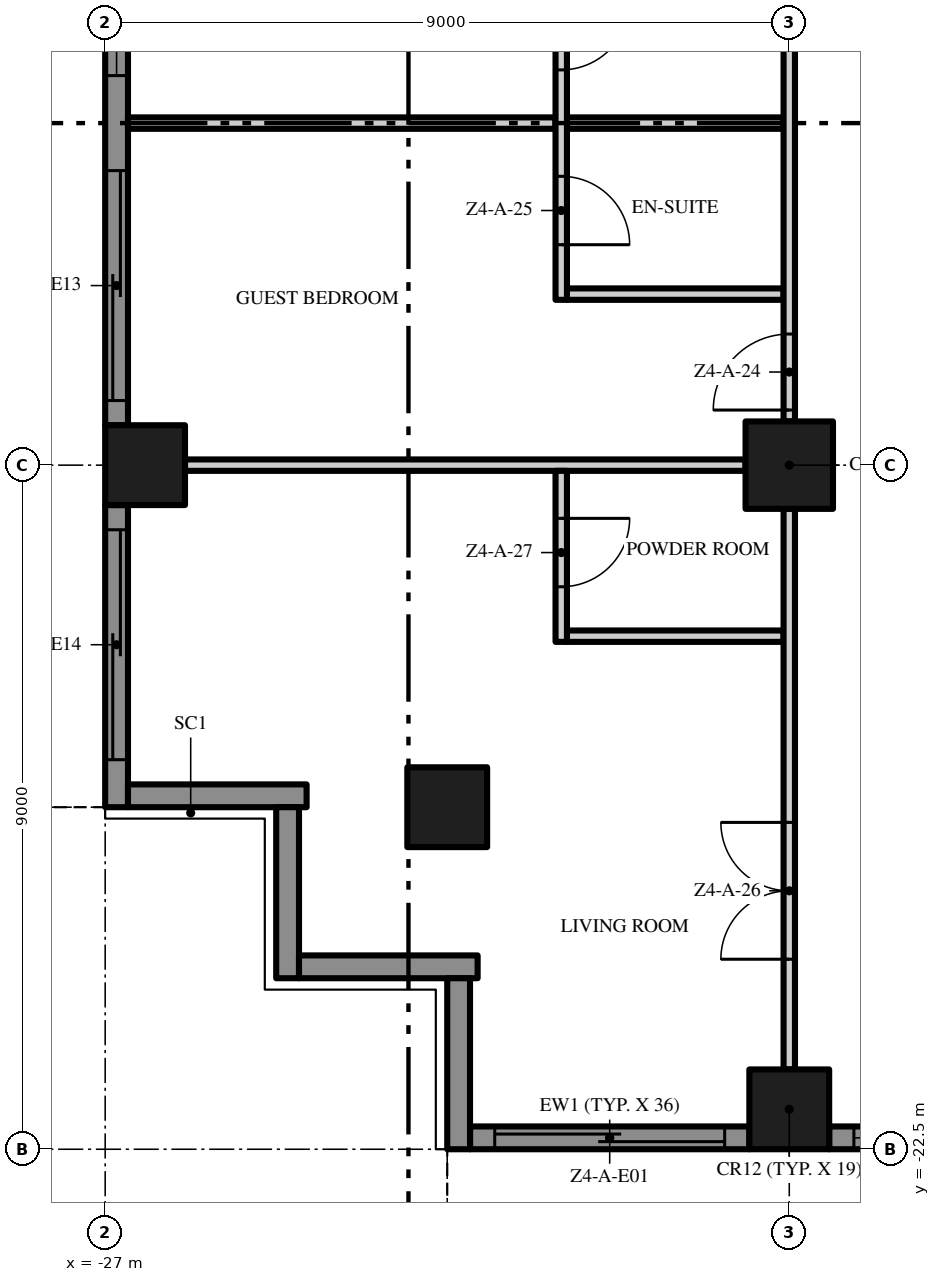
"""IFC4 building model, lengths in metres.
Left out: names, types, materials, properties, quantities, classifications, styles, units other than length and angle.
Written with IfcOpenShell. Run it as: python <this file> out.ifc"""

import sys

from ifc_helpers import new_model, si_unit, direction, frame, frame_2d, origin, origin_2d, place, context, subcontext, project, spatial, polyline, rectangle, outline, extrude, element, fill, save


model = new_model("IFC4")
c1 = context("Model", 3, precision=1e-05, world=origin(), true_north=direction((0.0, 1.0)))
c2 = subcontext(c1, "Body", "Model", "MODEL_VIEW")
j1 = project(units=[si_unit("LENGTHUNIT", "METRE"), si_unit("PLANEANGLEUNIT", "RADIAN")], contexts=[c1])
p1 = place(None, origin())
s1 = spatial("IfcSite", under=j1, at=p1, CompositionType="ELEMENT")
p2 = place(p1, origin())
s2 = spatial("IfcBuilding", under=s1, at=p2, CompositionType="ELEMENT")
p3 = place(p2, frame((0.0, 0.0, 184.4)))
s3 = spatial("IfcBuildingStorey", under=s2, at=p3, CompositionType="ELEMENT", Elevation=184.4)
p4 = place(p3, frame((-18.0, -13.5, 0.0), z_axis=(0.0, 0.0, 1.0), x_axis=(1.0, 0.0, 0.0)))
e1 = element("IfcColumn", 1, at=p4, inside=s3, PredefinedType="COLUMN", context=c2, shape_type="SweptSolid", body=[
    extrude(rectangle(XDim=1.15, YDim=1.15, at=origin_2d()), origin(), (0.0, 0.0, 1.0), 3.5),
])
for number, where, z_axis, x_axis in (
    (2, (-18.0, -21.975, 0.0), (0.0, 0.0, 1.0), (1.0, 0.0, 0.0)),
    (3, (-26.475, -13.5, 0.0), (0.0, 0.0, 1.0), (1.0, 0.0, 0.0)),
    (4, (-22.5, -18.0, 0.0), (0.0, 0.0, 1.0), (1.0, 0.0, 0.0)),
):
    element("IfcColumn", number, at=place(p3, frame(where, z_axis=z_axis, x_axis=x_axis)), inside=s3, PredefinedType="COLUMN", context=c2, shape_type="SweptSolid", body=[
        extrude(rectangle(XDim=1.05, YDim=1.05, at=origin_2d()), origin(), (0.0, 0.0, 1.0), 3.5),
    ])
p5 = place(p3, frame((-18.525, -22.35, 0.0), z_axis=(0.0, 0.0, 1.0), x_axis=(-1.0, 0.0, 0.0)))
e5 = element("IfcWall", 5, at=p5, inside=s3, PredefinedType="SOLIDWALL", context=c2, shape_type="SweptSolid", body=[
    extrude(rectangle(XDim=3.675, YDim=0.3, at=frame_2d((1.837, 0.0))), origin(), (0.0, 0.0, 1.0), 3.5),
])
p6 = place(p5, frame((0.325, 0.0, 0.0)))
e6 = element("IfcOpeningElement", 6, at=p6, cuts=e5, PredefinedType="OPENING", context=c2, shape_type="SweptSolid", body=[
    extrude(rectangle(XDim=3.025, YDim=2.4, at=frame_2d((1.512, 1.2))), frame((0.0, 0.16, 0.0), z_axis=(0.0, -1.0, 0.0), x_axis=(1.0, 0.0, 0.0)), (0.0, 0.0, 1.0), 0.32),
])
p7 = place(p3, frame((-9.525, -22.35, 0.0), z_axis=(0.0, 0.0, 1.0), x_axis=(-1.0, 0.0, 0.0)))
e7 = element("IfcWall", 7, at=p7, inside=s3, PredefinedType="SOLIDWALL", context=c2, shape_type="SweptSolid", body=[
    extrude(rectangle(XDim=7.95, YDim=0.3, at=frame_2d((3.975, 0.0))), origin(), (0.0, 0.0, 1.0), 3.5),
])
p8 = place(p7, frame((4.6, 0.0, 0.45)))
e8 = element("IfcOpeningElement", 8, at=p8, cuts=e7, PredefinedType="OPENING", context=c2, shape_type="SweptSolid", body=[
    extrude(rectangle(XDim=3.025, YDim=2.65, at=frame_2d((1.512, 1.325))), frame((0.0, 0.16, 0.0), z_axis=(0.0, -1.0, 0.0), x_axis=(1.0, 0.0, 0.0)), (0.0, 0.0, 1.0), 0.32),
])
p9 = place(p7, frame((0.325, 0.0, 0.45)))
e9 = element("IfcOpeningElement", 9, at=p9, cuts=e7, PredefinedType="OPENING", context=c2, shape_type="SweptSolid", body=[
    extrude(rectangle(XDim=3.025, YDim=2.65, at=frame_2d((1.512, 1.325))), frame((0.0, 0.16, 0.0), z_axis=(0.0, -1.0, 0.0), x_axis=(1.0, 0.0, 0.0)), (0.0, 0.0, 1.0), 0.32),
])
p10 = place(p3, frame((-26.85, -12.975, 0.0), z_axis=(0.0, 0.0, 1.0), x_axis=(0.0, 1.0, 0.0)))
e10 = element("IfcWall", 10, at=p10, inside=s3, PredefinedType="SOLIDWALL", context=c2, shape_type="SweptSolid", body=[
    extrude(rectangle(XDim=7.95, YDim=0.3, at=frame_2d((3.975, 0.0))), origin(), (0.0, 0.0, 1.0), 3.5),
])
p11 = place(p10, frame((4.6, 0.0, 0.45)))
e11 = element("IfcOpeningElement", 11, at=p11, cuts=e10, PredefinedType="OPENING", context=c2, shape_type="SweptSolid", body=[
    extrude(rectangle(XDim=3.025, YDim=2.65, at=frame_2d((1.512, 1.325))), frame((0.0, 0.16, 0.0), z_axis=(0.0, -1.0, 0.0), x_axis=(1.0, 0.0, 0.0)), (0.0, 0.0, 1.0), 0.32),
])
p12 = place(p10, frame((0.325, 0.0, 0.0)))
e12 = element("IfcOpeningElement", 12, at=p12, cuts=e10, PredefinedType="OPENING", context=c2, shape_type="SweptSolid", body=[
    extrude(rectangle(XDim=3.025, YDim=2.4, at=frame_2d((1.512, 1.2))), frame((0.0, 0.16, 0.0), z_axis=(0.0, -1.0, 0.0), x_axis=(1.0, 0.0, 0.0)), (0.0, 0.0, 1.0), 0.32),
])
p13 = place(p3, frame((-26.85, -18.0, 0.0), z_axis=(0.0, 0.0, 1.0), x_axis=(0.0, 1.0, 0.0)))
e13 = element("IfcWall", 13, at=p13, inside=s3, PredefinedType="SOLIDWALL", context=c2, shape_type="SweptSolid", body=[
    extrude(rectangle(XDim=3.975, YDim=0.3, at=frame_2d((1.988, 0.0))), origin(), (0.0, 0.0, 1.0), 3.5),
])
p14 = place(p13, frame((0.625, 0.0, 0.0)))
e14 = element("IfcOpeningElement", 14, at=p14, cuts=e13, PredefinedType="OPENING", context=c2, shape_type="SweptSolid", body=[
    extrude(rectangle(XDim=3.025, YDim=2.4, at=frame_2d((1.512, 1.2))), frame((0.0, 0.16, 0.0), z_axis=(0.0, -1.0, 0.0), x_axis=(1.0, 0.0, 0.0)), (0.0, 0.0, 1.0), 0.32),
])
p15 = place(p3, frame((-24.35, -17.85, 0.0), z_axis=(0.0, 0.0, 1.0), x_axis=(-1.0, 0.0, 0.0)))
e15 = element("IfcWall", 15, at=p15, inside=s3, PredefinedType="SOLIDWALL", context=c2, shape_type="SweptSolid", body=[
    extrude(rectangle(XDim=2.35, YDim=0.3, at=frame_2d((1.175, 0.0))), origin(), (0.0, 0.0, 1.0), 3.5),
])
p16 = place(p3, frame((-24.6, -20.25, 0.0), z_axis=(0.0, 0.0, 1.0), x_axis=(0.0, 1.0, 0.0)))
e16 = element("IfcWall", 16, at=p16, inside=s3, PredefinedType="SOLIDWALL", context=c2, shape_type="SweptSolid", body=[
    extrude(rectangle(XDim=2.25, YDim=0.3, at=frame_2d((1.125, 0.0))), origin(), (0.0, 0.0, 1.0), 3.5),
])
p17 = place(p3, frame((-22.1, -20.1, 0.0), z_axis=(0.0, 0.0, 1.0), x_axis=(-1.0, 0.0, 0.0)))
e17 = element("IfcWall", 17, at=p17, inside=s3, PredefinedType="SOLIDWALL", context=c2, shape_type="SweptSolid", body=[
    extrude(rectangle(XDim=2.35, YDim=0.3, at=frame_2d((1.175, 0.0))), origin(), (0.0, 0.0, 1.0), 3.5),
])
p18 = place(p3, frame((-22.35, -22.5, 0.0), z_axis=(0.0, 0.0, 1.0), x_axis=(0.0, 1.0, 0.0)))
e18 = element("IfcWall", 18, at=p18, inside=s3, PredefinedType="SOLIDWALL", context=c2, shape_type="SweptSolid", body=[
    extrude(rectangle(XDim=2.25, YDim=0.3, at=frame_2d((1.125, 0.0))), origin(), (0.0, 0.0, 1.0), 3.5),
])
p19 = place(p3, origin())
e19 = element("IfcWall", 19, at=p19, inside=s3, PredefinedType="USERDEFINED", context=c2, shape_type="SweptSolid", body=[
    extrude(outline(polyline([(-22.5, -25.149), (-21.0, -25.485), (-20.625, -25.5), (-19.5, -25.369), (-18.0, -24.845), (-16.5, -24.112), (-15.0, -23.451), (-13.5, -23.115), (-13.125, -23.1), (-12.0, -23.231), (-10.5, -23.755), (-9.0, -24.488), (-7.5, -25.149), (-6.0, -25.485), (-5.625, -25.5), (-4.5, -25.369), (-3.0, -24.845), (-1.5, -24.112), (0.0, -23.451), (1.5, -23.115), (1.875, -23.1), (3.0, -23.231), (4.5, -23.755), (6.0, -24.488), (7.5, -25.149), (9.0, -25.485), (9.375, -25.5), (10.5, -25.369), (12.0, -24.845), (13.5, -24.112), (15.0, -23.451), (16.5, -23.115), (16.875, -23.1), (18.0, -23.231), (19.5, -23.755), (21.0, -24.488), (22.5, -25.149), (22.601, -24.92), (21.105, -24.261), (19.596, -23.524), (18.056, -22.986), (16.885, -22.849), (16.467, -22.866), (14.921, -23.213), (13.395, -23.885), (11.904, -24.614), (10.444, -25.124), (9.365, -25.249), (9.033, -25.236), (7.579, -24.91), (6.105, -24.261), (4.596, -23.524), (3.056, -22.986), (1.885, -22.849), (1.467, -22.866), (-0.079, -23.213), (-1.605, -23.885), (-3.096, -24.614), (-4.556, -25.124), (-5.635, -25.249), (-5.967, -25.236), (-7.421, -24.91), (-8.895, -24.261), (-10.404, -23.524), (-11.944, -22.986), (-13.115, -22.849), (-13.533, -22.866), (-15.079, -23.213), (-16.605, -23.885), (-18.096, -24.614), (-19.556, -25.124), (-20.635, -25.249), (-20.967, -25.236), (-22.445, -24.905), (-22.5, -25.149)])), origin(), (0.0, 0.0, 1.0), 0.9),
])
p20 = place(p3, origin())
e20 = element("IfcWall", 20, at=p20, inside=s3, PredefinedType="USERDEFINED", context=c2, shape_type="SweptSolid", body=[
    extrude(outline(polyline([(-29.649, 18.0), (-29.985, 16.5), (-30.0, 16.125), (-29.869, 15.0), (-29.345, 13.5), (-28.612, 12.0), (-27.951, 10.5), (-27.615, 9.0), (-27.6, 8.625), (-27.731, 7.5), (-28.255, 6.0), (-28.988, 4.5), (-29.649, 3.0), (-29.985, 1.5), (-30.0, 1.125), (-29.869, 0.0), (-29.345, -1.5), (-28.612, -3.0), (-27.951, -4.5), (-27.615, -6.0), (-27.6, -6.375), (-27.731, -7.5), (-28.255, -9.0), (-28.988, -10.5), (-29.649, -12.0), (-29.985, -13.5), (-30.0, -13.875), (-29.869, -15.0), (-29.345, -16.5), (-28.612, -18.0), (-28.388, -17.89), (-29.114, -16.404), (-29.624, -14.944), (-29.749, -13.865), (-29.736, -13.533), (-29.41, -12.079), (-28.761, -10.605), (-28.024, -9.096), (-27.486, -7.556), (-27.349, -6.385), (-27.366, -5.967), (-27.713, -4.421), (-28.385, -2.895), (-29.114, -1.404), (-29.624, 0.056), (-29.749, 1.135), (-29.736, 1.467), (-29.41, 2.921), (-28.761, 4.395), (-28.024, 5.904), (-27.486, 7.444), (-27.349, 8.615), (-27.366, 9.033), (-27.713, 10.579), (-28.385, 12.105), (-29.114, 13.596), (-29.624, 15.056), (-29.749, 16.135), (-29.736, 16.467), (-29.405, 17.945), (-29.649, 18.0)])), origin(), (0.0, 0.0, 1.0), 0.9),
])
p21 = place(p3, frame((-20.925, -15.75, 0.0), z_axis=(0.0, 0.0, 1.0), x_axis=(1.0, 0.0, 0.0)))
e21 = element("IfcWall", 21, at=p21, inside=s3, PredefinedType="PARTITIONING", context=c2, shape_type="SweptSolid", body=[
    extrude(rectangle(XDim=2.85, YDim=0.15, at=frame_2d((1.425, 0.0))), origin(), (0.0, 0.0, 1.0), 3.5),
])
p22 = place(p3, frame((-25.95, -13.5, 0.0), z_axis=(0.0, 0.0, 1.0), x_axis=(1.0, 0.0, 0.0)))
e22 = element("IfcWall", 22, at=p22, inside=s3, PredefinedType="PARTITIONING", context=c2, shape_type="SweptSolid", body=[
    extrude(rectangle(XDim=7.375, YDim=0.15, at=frame_2d((3.688, 0.0))), origin(), (0.0, 0.0, 1.0), 3.5),
])
p23 = place(p3, frame((-20.925, -11.25, 0.0), z_axis=(0.0, 0.0, 1.0), x_axis=(1.0, 0.0, 0.0)))
e23 = element("IfcWall", 23, at=p23, inside=s3, PredefinedType="PARTITIONING", context=c2, shape_type="SweptSolid", body=[
    extrude(rectangle(XDim=2.85, YDim=0.15, at=frame_2d((1.425, 0.0))), origin(), (0.0, 0.0, 1.0), 3.5),
])
p24 = place(p3, frame((-26.7, -9.0, 0.0), z_axis=(0.0, 0.0, 1.0), x_axis=(1.0, 0.0, 0.0)))
e24 = element("IfcWall", 24, at=p24, inside=s3, PredefinedType="PARTITIONING", context=c2, shape_type="SweptSolid", body=[
    extrude(rectangle(XDim=5.625, YDim=0.15, at=frame_2d((2.812, 0.0))), origin(), (0.0, 0.0, 1.0), 3.5),
])
p25 = place(p3, frame((-20.925, -9.0, 0.0), z_axis=(0.0, 0.0, 1.0), x_axis=(1.0, 0.0, 0.0)))
e25 = element("IfcWall", 25, at=p25, inside=s3, PredefinedType="PARTITIONING", context=c2, shape_type="SweptSolid", body=[
    extrude(rectangle(XDim=2.85, YDim=0.15, at=frame_2d((1.425, 0.0))), origin(), (0.0, 0.0, 1.0), 3.5),
])
p26 = place(p3, frame((-21.0, -13.575, 0.0), z_axis=(0.0, 0.0, 1.0), x_axis=(0.0, -1.0, 0.0)))
e26 = element("IfcWall", 26, at=p26, inside=s3, PredefinedType="PARTITIONING", context=c2, shape_type="SweptSolid", body=[
    extrude(rectangle(XDim=2.25, YDim=0.15, at=frame_2d((1.125, 0.0))), origin(), (0.0, 0.0, 1.0), 3.5),
])
p27 = place(p26, frame((0.625, 0.0, 0.0)))
e27 = element("IfcOpeningElement", 27, at=p27, cuts=e26, PredefinedType="OPENING", context=c2, shape_type="SweptSolid", body=[
    extrude(rectangle(XDim=0.9, YDim=2.1, at=frame_2d((0.45, 1.05))), frame((0.0, 0.085, 0.0), z_axis=(0.0, -1.0, 0.0), x_axis=(1.0, 0.0, 0.0)), (0.0, 0.0, 1.0), 0.17),
])
p28 = place(p3, frame((-21.0, -6.675, 0.0), z_axis=(0.0, 0.0, 1.0), x_axis=(0.0, -1.0, 0.0)))
e28 = element("IfcWall", 28, at=p28, inside=s3, PredefinedType="PARTITIONING", context=c2, shape_type="SweptSolid", body=[
    extrude(rectangle(XDim=4.65, YDim=0.15, at=frame_2d((2.325, 0.0))), origin(), (0.0, 0.0, 1.0), 3.5),
])
p29 = place(p28, frame((0.725, 0.0, 0.0)))
e29 = element("IfcOpeningElement", 29, at=p29, cuts=e28, PredefinedType="OPENING", context=c2, shape_type="SweptSolid", body=[
    extrude(rectangle(XDim=0.9, YDim=2.1, at=frame_2d((0.45, 1.05))), frame((0.0, 0.085, 0.0), z_axis=(0.0, -1.0, 0.0), x_axis=(1.0, 0.0, 0.0)), (0.0, 0.0, 1.0), 0.17),
])
p30 = place(p28, frame((3.025, 0.0, 0.0)))
e30 = element("IfcOpeningElement", 30, at=p30, cuts=e28, PredefinedType="OPENING", context=c2, shape_type="SweptSolid", body=[
    extrude(rectangle(XDim=0.9, YDim=2.1, at=frame_2d((0.45, 1.05))), frame((0.0, 0.085, 0.0), z_axis=(0.0, -1.0, 0.0), x_axis=(1.0, 0.0, 0.0)), (0.0, 0.0, 1.0), 0.17),
])
p31 = place(p3, frame((-18.0, -21.45, 0.0), z_axis=(0.0, 0.0, 1.0), x_axis=(0.0, 1.0, 0.0)))
e31 = element("IfcWall", 31, at=p31, inside=s3, PredefinedType="PARTITIONING", context=c2, shape_type="SweptSolid", body=[
    extrude(rectangle(XDim=7.375, YDim=0.15, at=frame_2d((3.688, 0.0))), origin(), (0.0, 0.0, 1.0), 3.5),
])
p32 = place(p31, frame((1.45, 0.0, 0.0)))
e32 = element("IfcOpeningElement", 32, at=p32, cuts=e31, PredefinedType="OPENING", context=c2, shape_type="SweptSolid", body=[
    extrude(rectangle(XDim=1.8, YDim=2.4, at=frame_2d((0.9, 1.2))), frame((0.0, 0.085, 0.0), z_axis=(0.0, -1.0, 0.0), x_axis=(1.0, 0.0, 0.0)), (0.0, 0.0, 1.0), 0.17),
])
p33 = place(p3, frame((-18.0, -12.925, 0.0), z_axis=(0.0, 0.0, 1.0), x_axis=(0.0, 1.0, 0.0)))
e33 = element("IfcWall", 33, at=p33, inside=s3, PredefinedType="PARTITIONING", context=c2, shape_type="SweptSolid", body=[
    extrude(rectangle(XDim=7.85, YDim=0.15, at=frame_2d((3.925, 0.0))), origin(), (0.0, 0.0, 1.0), 3.5),
])
p34 = place(p33, frame((6.7, 0.0, 0.0)))
e34 = element("IfcOpeningElement", 34, at=p34, cuts=e33, PredefinedType="OPENING", context=c2, shape_type="SweptSolid", body=[
    extrude(rectangle(XDim=1.0, YDim=2.4, at=frame_2d((0.5, 1.2))), frame((0.0, 0.085, 0.0), z_axis=(0.0, -1.0, 0.0), x_axis=(1.0, 0.0, 0.0)), (0.0, 0.0, 1.0), 0.17),
])
p35 = place(p33, frame((0.15, 0.0, 0.0)))
e35 = element("IfcOpeningElement", 35, at=p35, cuts=e33, PredefinedType="OPENING", context=c2, shape_type="SweptSolid", body=[
    extrude(rectangle(XDim=1.0, YDim=2.4, at=frame_2d((0.5, 1.2))), frame((0.0, 0.085, 0.0), z_axis=(0.0, -1.0, 0.0), x_axis=(1.0, 0.0, 0.0)), (0.0, 0.0, 1.0), 0.17),
])
p36 = place(p6, origin())
e36 = element("IfcDoor", 36, at=p36, inside=s3, OperationType="SINGLE_SWING_LEFT", PredefinedType="DOOR", context=c2, shape_type="SweptSolid", body=[
    extrude(rectangle(XDim=3.025, YDim=2.4, at=frame_2d((1.512, 1.2))), frame((0.0, 0.025, 0.0), z_axis=(0.0, -1.0, 0.0), x_axis=(1.0, 0.0, 0.0)), (0.0, 0.0, 1.0), 0.05),
])
fill(e6, e36)
p37 = place(p8, origin())
e37 = element("IfcWindow", 37, at=p37, inside=s3, PartitioningType="SINGLE_PANEL", PredefinedType="WINDOW", context=c2, shape_type="SweptSolid", body=[
    extrude(rectangle(XDim=3.025, YDim=2.65, at=frame_2d((1.512, 1.325))), frame((0.0, 0.03, 0.0), z_axis=(0.0, -1.0, 0.0), x_axis=(1.0, 0.0, 0.0)), (0.0, 0.0, 1.0), 0.06),
])
fill(e8, e37)
p38 = place(p11, origin())
e38 = element("IfcWindow", 38, at=p38, inside=s3, PartitioningType="SINGLE_PANEL", PredefinedType="WINDOW", context=c2, shape_type="SweptSolid", body=[
    extrude(rectangle(XDim=3.025, YDim=2.65, at=frame_2d((1.512, 1.325))), frame((0.0, 0.03, 0.0), z_axis=(0.0, -1.0, 0.0), x_axis=(1.0, 0.0, 0.0)), (0.0, 0.0, 1.0), 0.06),
])
fill(e11, e38)
p39 = place(p12, origin())
e39 = element("IfcDoor", 39, at=p39, inside=s3, OperationType="SINGLE_SWING_LEFT", PredefinedType="DOOR", context=c2, shape_type="SweptSolid", body=[
    extrude(rectangle(XDim=3.025, YDim=2.4, at=frame_2d((1.512, 1.2))), frame((0.0, 0.025, 0.0), z_axis=(0.0, -1.0, 0.0), x_axis=(1.0, 0.0, 0.0)), (0.0, 0.0, 1.0), 0.05),
])
fill(e12, e39)
p40 = place(p14, origin())
e40 = element("IfcDoor", 40, at=p40, inside=s3, OperationType="SINGLE_SWING_LEFT", PredefinedType="DOOR", context=c2, shape_type="SweptSolid", body=[
    extrude(rectangle(XDim=3.025, YDim=2.4, at=frame_2d((1.512, 1.2))), frame((0.0, 0.025, 0.0), z_axis=(0.0, -1.0, 0.0), x_axis=(1.0, 0.0, 0.0)), (0.0, 0.0, 1.0), 0.05),
])
fill(e14, e40)
p41 = place(p29, origin())
e41 = element("IfcDoor", 41, at=p41, inside=s3, OperationType="SINGLE_SWING_LEFT", PredefinedType="DOOR", context=c2, shape_type="SweptSolid", body=[
    extrude(rectangle(XDim=0.9, YDim=2.1, at=frame_2d((0.45, 1.05))), frame((0.0, 0.025, 0.0), z_axis=(0.0, -1.0, 0.0), x_axis=(1.0, 0.0, 0.0)), (0.0, 0.0, 1.0), 0.05),
])
fill(e29, e41)
p42 = place(p35, origin())
e42 = element("IfcDoor", 42, at=p42, inside=s3, OperationType="SINGLE_SWING_LEFT", PredefinedType="DOOR", context=c2, shape_type="SweptSolid", body=[
    extrude(rectangle(XDim=1.0, YDim=2.4, at=frame_2d((0.5, 1.2))), frame((0.0, 0.025, 0.0), z_axis=(0.0, -1.0, 0.0), x_axis=(1.0, 0.0, 0.0)), (0.0, 0.0, 1.0), 0.05),
])
fill(e35, e42)
p43 = place(p30, origin())
e43 = element("IfcDoor", 43, at=p43, inside=s3, OperationType="SINGLE_SWING_RIGHT", PredefinedType="DOOR", context=c2, shape_type="SweptSolid", body=[
    extrude(rectangle(XDim=0.9, YDim=2.1, at=frame_2d((0.45, 1.05))), frame((0.0, 0.025, 0.0), z_axis=(0.0, -1.0, 0.0), x_axis=(1.0, 0.0, 0.0)), (0.0, 0.0, 1.0), 0.05),
])
fill(e30, e43)
p44 = place(p32, origin())
e44 = element("IfcDoor", 44, at=p44, inside=s3, OperationType="DOUBLE_DOOR_SINGLE_SWING", PredefinedType="DOOR", context=c2, shape_type="SweptSolid", body=[
    extrude(rectangle(XDim=1.8, YDim=2.4, at=frame_2d((0.9, 1.2))), frame((0.0, 0.025, 0.0), z_axis=(0.0, -1.0, 0.0), x_axis=(1.0, 0.0, 0.0)), (0.0, 0.0, 1.0), 0.05),
])
fill(e32, e44)
p45 = place(p27, origin())
e45 = element("IfcDoor", 45, at=p45, inside=s3, OperationType="SINGLE_SWING_LEFT", PredefinedType="DOOR", context=c2, shape_type="SweptSolid", body=[
    extrude(rectangle(XDim=0.9, YDim=2.1, at=frame_2d((0.45, 1.05))), frame((0.0, 0.025, 0.0), z_axis=(0.0, -1.0, 0.0), x_axis=(1.0, 0.0, 0.0)), (0.0, 0.0, 1.0), 0.05),
])
fill(e27, e45)
save(model, sys.argv[1])
